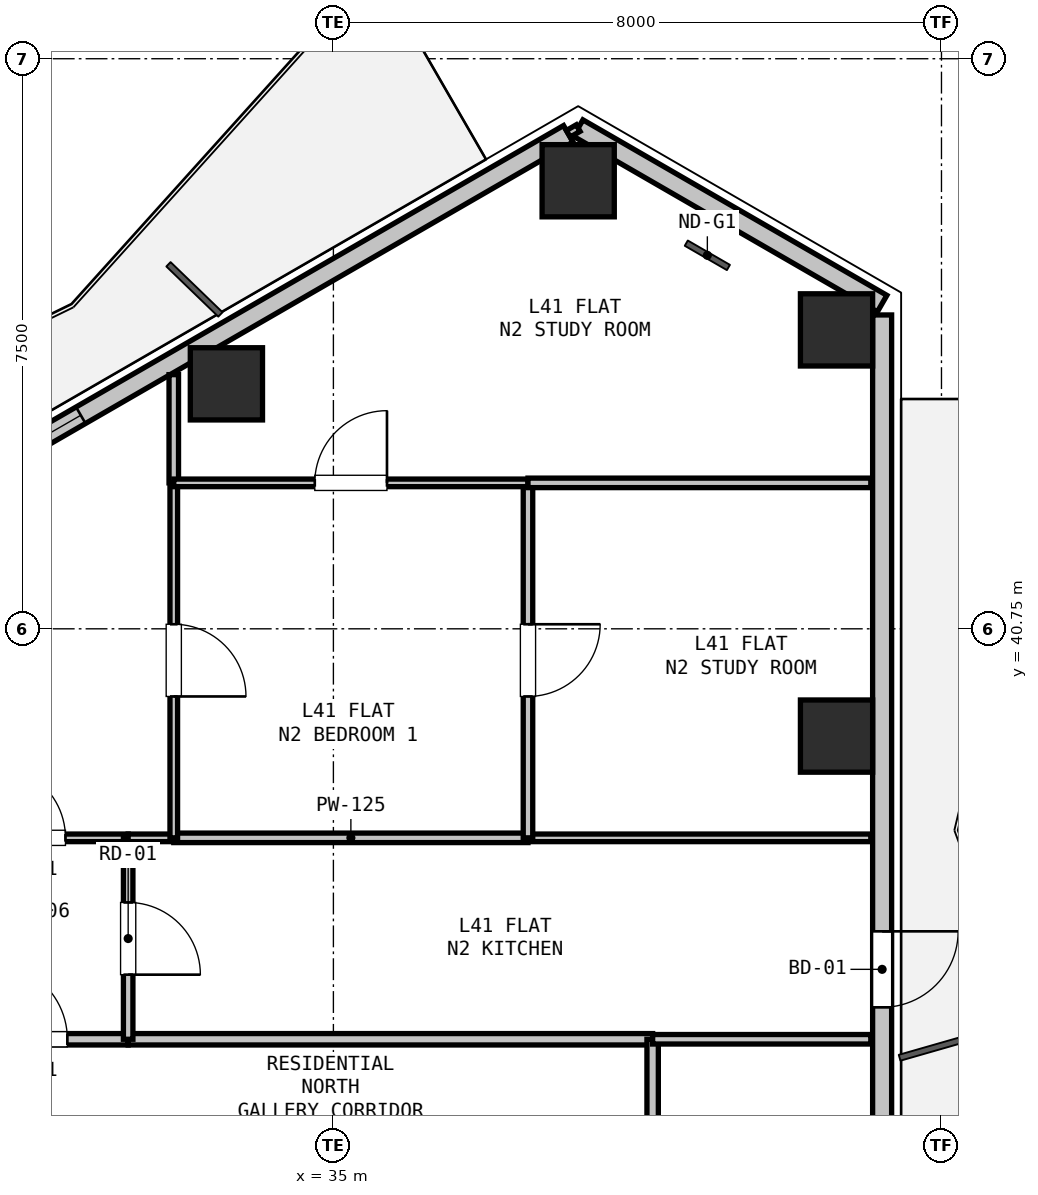
"""IFC4 building model, lengths in metres.
Left out: names, types, materials, properties, quantities, classifications, styles, units other than length and angle.
Written with IfcOpenShell. Run it as: python <this file> out.ifc"""

import sys

from ifc_helpers import new_model, si_unit, direction, frame, frame_2d, origin, origin_2d, place, context, subcontext, project, spatial, rectangle, hollow_rectangle, extrude, element, fill, save


model = new_model("IFC4")
c1 = context("Model", 3, precision=1e-05, world=origin(), true_north=direction((0.0, 1.0)))
c2 = subcontext(c1, "Body", "Model", "MODEL_VIEW")
j1 = project(units=[si_unit("LENGTHUNIT", "METRE"), si_unit("PLANEANGLEUNIT", "RADIAN")], contexts=[c1])
p1 = place(None, origin())
s1 = spatial("IfcSite", under=j1, at=p1, CompositionType="ELEMENT")
p2 = place(p1, origin())
s2 = spatial("IfcBuilding", under=s1, at=p2, CompositionType="ELEMENT")
p3 = place(p2, frame((0.0, 0.0, 147.6)))
s3 = spatial("IfcBuildingStorey", under=s2, at=p3, CompositionType="ELEMENT", Elevation=147.6)
for number, where, z_axis, x_axis in (
    (1, (33.593, 43.973, 0.0), (0.0, 0.0, 1.0), (1.0, 0.0, 0.0)),
    (2, (38.22, 46.645, 0.0), (0.0, 0.0, 1.0), (1.0, 0.0, 0.0)),
    (3, (41.619, 44.683, 0.0), (0.0, 0.0, 1.0), (1.0, 0.0, 0.0)),
    (4, (41.619, 39.339, 0.0), (0.0, 0.0, 1.0), (1.0, 0.0, 0.0)),
):
    element("IfcColumn", number, at=place(p3, frame(where, z_axis=z_axis, x_axis=x_axis)), inside=s3, PredefinedType="COLUMN", context=c2, shape_type="SweptSolid", body=[
        extrude(hollow_rectangle(XDim=0.95, YDim=0.95, WallThickness=0.028, at=origin_2d()), origin(), (0.0, 0.0, 1.0), 3.3),
    ])
p4 = place(p3, frame((38.22, 47.338, 0.0), z_axis=(0.0, 0.0, 1.0), x_axis=(0.866035021055, -0.499983342029, 0.0)))
e5 = element("IfcWall", 5, at=p4, inside=s3, PredefinedType="SOLIDWALL", context=c2, shape_type="SweptSolid", body=[
    extrude(rectangle(XDim=4.617, YDim=0.25, at=frame_2d((2.309, 0.0))), origin(), (0.0, 0.0, 1.0), 2.68),
])
p5 = place(p3, frame((28.403, 41.67, 0.0), z_axis=(0.0, 0.0, 1.0), x_axis=(0.86602239209, 0.500005216371, 0.0)))
e6 = element("IfcWall", 6, at=p5, inside=s3, PredefinedType="SOLIDWALL", context=c2, shape_type="SweptSolid", body=[
    extrude(rectangle(XDim=11.186, YDim=0.25, at=frame_2d((5.593, 0.0))), origin(), (0.0, 0.0, 1.0), 2.68),
])
p6 = place(p5, frame((2.88, 0.0, 0.9)))
e7 = element("IfcOpeningElement", 7, at=p6, cuts=e6, PredefinedType="OPENING", context=c2, shape_type="SweptSolid", body=[
    extrude(rectangle(XDim=0.9, YDim=1.4, at=frame_2d((0.45, 0.7))), frame((0.0, 0.135, 0.0), z_axis=(0.0, -1.0, 0.0), x_axis=(1.0, 0.0, 0.0)), (0.0, 0.0, 1.0), 0.27),
])
p7 = place(p3, frame((42.219, 44.879, 0.0), z_axis=(0.0, 0.0, 1.0), x_axis=(0.0, -1.0, 0.0)))
e8 = element("IfcWall", 8, at=p7, inside=s3, PredefinedType="SOLIDWALL", context=c2, shape_type="SweptSolid", body=[
    extrude(rectangle(XDim=11.186, YDim=0.25, at=frame_2d((5.593, 0.0))), origin(), (0.0, 0.0, 1.0), 2.68),
])
p8 = place(p7, frame((8.109, 0.0, 0.0)))
e9 = element("IfcOpeningElement", 9, at=p8, cuts=e8, PredefinedType="OPENING", context=c2, shape_type="SweptSolid", body=[
    extrude(rectangle(XDim=1.0, YDim=2.1, at=frame_2d((0.5, 1.05))), frame((0.0, 0.135, 0.0), z_axis=(0.0, -1.0, 0.0), x_axis=(1.0, 0.0, 0.0)), (0.0, 0.0, 1.0), 0.27),
])
p9 = place(p3, frame((29.7, 35.35, 0.0), z_axis=(0.0, 0.0, 1.0), x_axis=(1.0, 0.0, 0.0)))
e10 = element("IfcWall", 10, at=p9, inside=s3, PredefinedType="PARTITIONING", context=c2, shape_type="SweptSolid", body=[
    extrude(rectangle(XDim=2.6, YDim=0.15, at=frame_2d((1.3, 0.0))), origin(), (0.0, 0.0, 1.0), 3.06),
])
p10 = place(p9, frame((0.8, 0.0, 0.0)))
e11 = element("IfcOpeningElement", 11, at=p10, cuts=e10, PredefinedType="OPENING", context=c2, shape_type="SweptSolid", body=[
    extrude(rectangle(XDim=1.0, YDim=2.15, at=frame_2d((0.5, 1.075))), frame((0.0, 0.085, 0.0), z_axis=(0.0, -1.0, 0.0), x_axis=(1.0, 0.0, 0.0)), (0.0, 0.0, 1.0), 0.17),
])
p11 = place(p3, frame((32.3, 35.35, 0.0), z_axis=(0.0, 0.0, 1.0), x_axis=(1.0, 0.0, 0.0)))
e12 = element("IfcWall", 12, at=p11, inside=s3, PredefinedType="PARTITIONING", context=c2, shape_type="SweptSolid", body=[
    extrude(rectangle(XDim=6.9, YDim=0.15, at=frame_2d((3.45, 0.0))), origin(), (0.0, 0.0, 1.0), 2.433),
])
p12 = place(p3, frame((39.2, 35.35, 0.0), z_axis=(0.0, 0.0, 1.0), x_axis=(0.0, -1.0, 0.0)))
e13 = element("IfcWall", 13, at=p12, inside=s3, PredefinedType="PARTITIONING", context=c2, shape_type="SweptSolid", body=[
    extrude(rectangle(XDim=1.75, YDim=0.15, at=frame_2d((0.875, 0.0))), origin(), (0.0, 0.0, 1.0), 3.06),
])
p13 = place(p3, frame((29.7, 38.0, 0.0), z_axis=(0.0, 0.0, 1.0), x_axis=(1.0, 0.0, 0.0)))
e14 = element("IfcWall", 14, at=p13, inside=s3, PredefinedType="PARTITIONING", context=c2, shape_type="SweptSolid", body=[
    extrude(rectangle(XDim=2.6, YDim=0.1, at=frame_2d((1.3, 0.0))), origin(), (0.0, 0.0, 1.0), 3.06),
])
p14 = place(p13, frame((0.825, 0.0, 0.0)))
e15 = element("IfcOpeningElement", 15, at=p14, cuts=e14, PredefinedType="OPENING", context=c2, shape_type="SweptSolid", body=[
    extrude(rectangle(XDim=0.95, YDim=2.1, at=frame_2d((0.475, 1.05))), frame((0.0, 0.06, 0.0), z_axis=(0.0, -1.0, 0.0), x_axis=(1.0, 0.0, 0.0)), (0.0, 0.0, 1.0), 0.12),
])
p15 = place(p3, frame((32.3, 38.0, 0.0), z_axis=(0.0, 0.0, 1.0), x_axis=(0.0, -1.0, 0.0)))
e16 = element("IfcWall", 16, at=p15, inside=s3, PredefinedType="PARTITIONING", context=c2, shape_type="SweptSolid", body=[
    extrude(rectangle(XDim=2.65, YDim=0.125, at=frame_2d((1.325, 0.0))), origin(), (0.0, 0.0, 1.0), 3.06),
])
p16 = place(p15, frame((0.85, 0.0, 0.0)))
e17 = element("IfcOpeningElement", 17, at=p16, cuts=e16, PredefinedType="OPENING", context=c2, shape_type="SweptSolid", body=[
    extrude(rectangle(XDim=0.95, YDim=2.1, at=frame_2d((0.475, 1.05))), frame((0.0, 0.073, 0.0), z_axis=(0.0, -1.0, 0.0), x_axis=(1.0, 0.0, 0.0)), (0.0, 0.0, 1.0), 0.145),
])
p17 = place(p3, frame((42.07, 35.35, 0.0), z_axis=(0.0, 0.0, 1.0), x_axis=(-1.0, 0.0, 0.0)))
e18 = element("IfcWall", 18, at=p17, inside=s3, PredefinedType="PARTITIONING", context=c2, shape_type="SweptSolid", body=[
    extrude(rectangle(XDim=2.87, YDim=0.125, at=frame_2d((1.435, 0.0))), origin(), (0.0, 0.0, 1.0), 2.365),
])
p18 = place(p3, frame((32.3, 38.0, 0.0), z_axis=(0.0, 0.0, 1.0), x_axis=(1.0, 0.0, 0.0)))
e19 = element("IfcWall", 19, at=p18, inside=s3, PredefinedType="PARTITIONING", context=c2, shape_type="SweptSolid", body=[
    extrude(rectangle(XDim=0.6, YDim=0.1, at=frame_2d((0.3, 0.0))), origin(), (0.0, 0.0, 1.0), 3.06),
])
p19 = place(p3, frame((32.9, 38.0, 0.0), z_axis=(0.0, 0.0, 1.0), x_axis=(1.0, 0.0, 0.0)))
e20 = element("IfcWall", 20, at=p19, inside=s3, PredefinedType="PARTITIONING", context=c2, shape_type="SweptSolid", body=[
    extrude(rectangle(XDim=4.66, YDim=0.125, at=frame_2d((2.33, 0.0))), origin(), (0.0, 0.0, 1.0), 2.433),
])
p20 = place(p3, frame((37.56, 38.0, 0.0), z_axis=(0.0, 0.0, 1.0), x_axis=(1.0, 0.0, 0.0)))
e21 = element("IfcWall", 21, at=p20, inside=s3, PredefinedType="PARTITIONING", context=c2, shape_type="SweptSolid", body=[
    extrude(rectangle(XDim=4.51, YDim=0.1, at=frame_2d((2.255, 0.0))), origin(), (0.0, 0.0, 1.0), 2.365),
])
p21 = place(p3, frame((32.9, 44.094, 0.0), z_axis=(0.0, 0.0, 1.0), x_axis=(0.0, -1.0, 0.0)))
e22 = element("IfcWall", 22, at=p21, inside=s3, PredefinedType="PARTITIONING", context=c2, shape_type="SweptSolid", body=[
    extrude(rectangle(XDim=1.424, YDim=0.125, at=frame_2d((0.712, 0.0))), origin(), (0.0, 0.0, 1.0), 2.365),
])
p22 = place(p3, frame((32.9, 42.67, 0.0), z_axis=(0.0, 0.0, 1.0), x_axis=(0.0, -1.0, 0.0)))
e23 = element("IfcWall", 23, at=p22, inside=s3, PredefinedType="PARTITIONING", context=c2, shape_type="SweptSolid", body=[
    extrude(rectangle(XDim=4.67, YDim=0.1, at=frame_2d((2.335, 0.0))), origin(), (0.0, 0.0, 1.0), 3.06),
])
p23 = place(p22, frame((1.86, 0.0, 0.0)))
e24 = element("IfcOpeningElement", 24, at=p23, cuts=e23, PredefinedType="OPENING", context=c2, shape_type="SweptSolid", body=[
    extrude(rectangle(XDim=0.95, YDim=2.1, at=frame_2d((0.475, 1.05))), frame((0.0, 0.06, 0.0), z_axis=(0.0, -1.0, 0.0), x_axis=(1.0, 0.0, 0.0)), (0.0, 0.0, 1.0), 0.12),
])
p24 = place(p3, frame((37.56, 42.67, 0.0), z_axis=(0.0, 0.0, 1.0), x_axis=(0.0, -1.0, 0.0)))
e25 = element("IfcWall", 25, at=p24, inside=s3, PredefinedType="PARTITIONING", context=c2, shape_type="SweptSolid", body=[
    extrude(rectangle(XDim=4.67, YDim=0.125, at=frame_2d((2.335, 0.0))), origin(), (0.0, 0.0, 1.0), 2.433),
])
p25 = place(p24, frame((1.86, 0.0, 0.0)))
e26 = element("IfcOpeningElement", 26, at=p25, cuts=e25, PredefinedType="OPENING", context=c2, shape_type="SweptSolid", body=[
    extrude(rectangle(XDim=0.95, YDim=2.1, at=frame_2d((0.475, 1.05))), frame((0.0, 0.073, 0.0), z_axis=(0.0, -1.0, 0.0), x_axis=(1.0, 0.0, 0.0)), (0.0, 0.0, 1.0), 0.145),
])
p26 = place(p3, frame((32.9, 42.67, 0.0), z_axis=(0.0, 0.0, 1.0), x_axis=(1.0, 0.0, 0.0)))
e27 = element("IfcWall", 27, at=p26, inside=s3, PredefinedType="PARTITIONING", context=c2, shape_type="SweptSolid", body=[
    extrude(rectangle(XDim=4.66, YDim=0.1, at=frame_2d((2.33, 0.0))), origin(), (0.0, 0.0, 1.0), 2.433),
])
p27 = place(p26, frame((1.855, 0.0, 0.0)))
e28 = element("IfcOpeningElement", 28, at=p27, cuts=e27, PredefinedType="OPENING", context=c2, shape_type="SweptSolid", body=[
    extrude(rectangle(XDim=0.95, YDim=2.1, at=frame_2d((0.475, 1.05))), frame((0.0, 0.06, 0.0), z_axis=(0.0, -1.0, 0.0), x_axis=(1.0, 0.0, 0.0)), (0.0, 0.0, 1.0), 0.12),
])
p28 = place(p3, frame((37.56, 42.67, 0.0), z_axis=(0.0, 0.0, 1.0), x_axis=(1.0, 0.0, 0.0)))
e29 = element("IfcWall", 29, at=p28, inside=s3, PredefinedType="PARTITIONING", context=c2, shape_type="SweptSolid", body=[
    extrude(rectangle(XDim=4.51, YDim=0.125, at=frame_2d((2.255, 0.0))), origin(), (0.0, 0.0, 1.0), 2.433),
])
p29 = place(p3, frame((38.091, 47.263, 0.0), z_axis=(0.0, 0.0, 1.0), x_axis=(0.865833797362, 0.500331725305, 0.0)))
e30 = element("IfcWall", 30, at=p29, inside=s3, PredefinedType="PARTITIONING", context=c2, shape_type="SweptSolid", body=[
    extrude(rectangle(XDim=0.15, YDim=0.1, at=frame_2d((0.075, 0.0))), origin(), (0.0, 0.0, 1.0), 3.06),
])
p30 = place(p6, origin())
e31 = element("IfcWindow", 31, at=p30, inside=s3, PartitioningType="SINGLE_PANEL", PredefinedType="WINDOW", context=c2, shape_type="SweptSolid", body=[
    extrude(rectangle(XDim=0.9, YDim=1.4, at=frame_2d((0.45, 0.7))), frame((0.0, 0.03, 0.0), z_axis=(0.0, -1.0, 0.0), x_axis=(1.0, 0.0, 0.0)), (0.0, 0.0, 1.0), 0.06),
])
fill(e7, e31)
p31 = place(p8, origin())
e32 = element("IfcDoor", 32, at=p31, inside=s3, OperationType="SINGLE_SWING_LEFT", PredefinedType="DOOR", context=c2, shape_type="SweptSolid", body=[
    extrude(rectangle(XDim=1.0, YDim=2.1, at=frame_2d((0.5, 1.05))), frame((0.0, 0.025, 0.0), z_axis=(0.0, -1.0, 0.0), x_axis=(1.0, 0.0, 0.0)), (0.0, 0.0, 1.0), 0.05),
])
fill(e9, e32)
p32 = place(p10, origin())
e33 = element("IfcDoor", 33, at=p32, inside=s3, OperationType="SINGLE_SWING_LEFT", PredefinedType="DOOR", context=c2, shape_type="SweptSolid", body=[
    extrude(rectangle(XDim=1.0, YDim=2.15, at=frame_2d((0.5, 1.075))), frame((0.0, 0.025, 0.0), z_axis=(0.0, -1.0, 0.0), x_axis=(1.0, 0.0, 0.0)), (0.0, 0.0, 1.0), 0.05),
])
fill(e11, e33)
p33 = place(p16, origin())
e34 = element("IfcDoor", 34, at=p33, inside=s3, OperationType="SINGLE_SWING_RIGHT", PredefinedType="DOOR", context=c2, shape_type="SweptSolid", body=[
    extrude(rectangle(XDim=0.95, YDim=2.1, at=frame_2d((0.475, 1.05))), frame((0.0, 0.025, 0.0), z_axis=(0.0, -1.0, 0.0), x_axis=(1.0, 0.0, 0.0)), (0.0, 0.0, 1.0), 0.05),
])
fill(e17, e34)
p34 = place(p14, origin())
e35 = element("IfcDoor", 35, at=p34, inside=s3, OperationType="SINGLE_SWING_LEFT", PredefinedType="DOOR", context=c2, shape_type="SweptSolid", body=[
    extrude(rectangle(XDim=0.95, YDim=2.1, at=frame_2d((0.475, 1.05))), frame((0.0, 0.025, 0.0), z_axis=(0.0, -1.0, 0.0), x_axis=(1.0, 0.0, 0.0)), (0.0, 0.0, 1.0), 0.05),
])
fill(e15, e35)
p35 = place(p23, origin())
e36 = element("IfcDoor", 36, at=p35, inside=s3, OperationType="SINGLE_SWING_RIGHT", PredefinedType="DOOR", context=c2, shape_type="SweptSolid", body=[
    extrude(rectangle(XDim=0.95, YDim=2.1, at=frame_2d((0.475, 1.05))), frame((0.0, 0.025, 0.0), z_axis=(0.0, -1.0, 0.0), x_axis=(1.0, 0.0, 0.0)), (0.0, 0.0, 1.0), 0.05),
])
fill(e24, e36)
p36 = place(p25, origin())
e37 = element("IfcDoor", 37, at=p36, inside=s3, OperationType="SINGLE_SWING_LEFT", PredefinedType="DOOR", context=c2, shape_type="SweptSolid", body=[
    extrude(rectangle(XDim=0.95, YDim=2.1, at=frame_2d((0.475, 1.05))), frame((0.0, 0.025, 0.0), z_axis=(0.0, -1.0, 0.0), x_axis=(1.0, 0.0, 0.0)), (0.0, 0.0, 1.0), 0.05),
])
fill(e26, e37)
p37 = place(p27, origin())
e38 = element("IfcDoor", 38, at=p37, inside=s3, OperationType="SINGLE_SWING_RIGHT", PredefinedType="DOOR", context=c2, shape_type="SweptSolid", body=[
    extrude(rectangle(XDim=0.95, YDim=2.1, at=frame_2d((0.475, 1.05))), frame((0.0, 0.025, 0.0), z_axis=(0.0, -1.0, 0.0), x_axis=(1.0, 0.0, 0.0)), (0.0, 0.0, 1.0), 0.05),
])
fill(e28, e38)
save(model, sys.argv[1])
